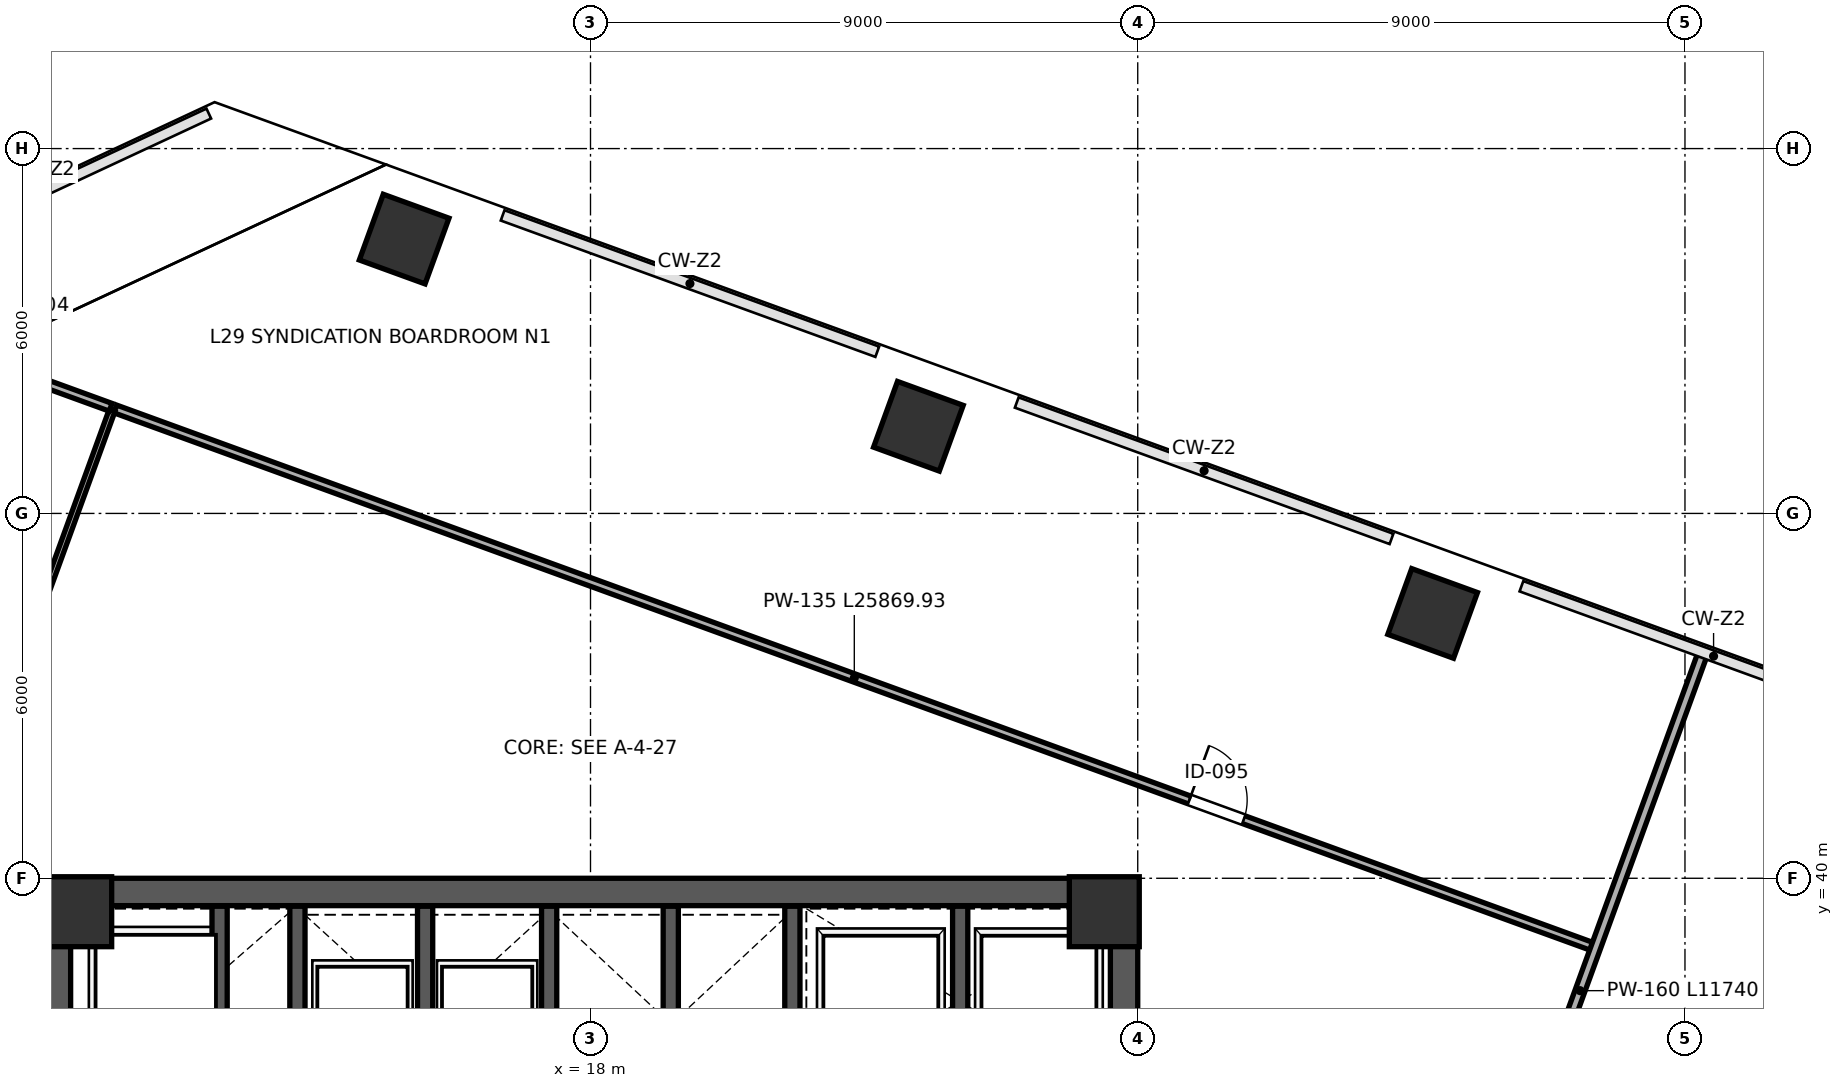
"""IFC4 building model, lengths in metres.
Left out: names, types, materials, properties, quantities, classifications, styles, units other than length and angle.
Written with IfcOpenShell. Run it as: python <this file> out.ifc"""

import sys

from ifc_helpers import new_model, si_unit, direction, frame, frame_2d, origin, origin_2d, place, context, subcontext, project, spatial, rectangle, extrude, clip, halfspace, source, transform, mapped, element, fill, save


model = new_model("IFC4")
c1 = context("Model", 3, precision=1e-05, world=origin(), true_north=direction((0.0, 1.0)))
c2 = subcontext(c1, "Body", "Model", "MODEL_VIEW")
j1 = project(units=[si_unit("LENGTHUNIT", "METRE"), si_unit("PLANEANGLEUNIT", "RADIAN")], contexts=[c1])
p1 = place(None, origin())
s1 = spatial("IfcSite", under=j1, at=p1, CompositionType="ELEMENT")
p2 = place(p1, origin())
s2 = spatial("IfcBuilding", under=s1, at=p2, CompositionType="ELEMENT")
p3 = place(p2, frame((0.0, 0.0, 133.0)))
s3 = spatial("IfcBuildingStorey", under=s2, at=p3, CompositionType="ELEMENT", Elevation=133.0)
m1 = source(origin(), c2, "Body", "SweptSolid", [
    extrude(rectangle(XDim=1.15, YDim=1.15, at=origin_2d()), origin(), (0.0, 0.0, 1.0), 4.198),
])
for number, where, z_axis, x_axis in (
    (1, (9.55, 39.45, 0.001), (0.0, 0.0, 1.0), (1.0, 0.0, 0.0)),
    (2, (26.45, 39.45, 0.001), (0.0, 0.0, 1.0), (1.0, 0.0, 0.0)),
):
    element("IfcColumn", number, at=place(p3, frame(where, z_axis=z_axis, x_axis=x_axis)), inside=s3, PredefinedType="COLUMN", context=c2, shape_type="MappedRepresentation", body=[
        mapped(m1, transform((0.0, 0.0, 0.0), scale=1.0)),
    ])
p4 = place(p3, frame((14.935, 50.512, 0.0), z_axis=(0.096054134155, 0.032846928477, 0.99483399751), x_axis=(-0.017896021663, -0.999236828421, 0.034720212203)))
e3 = element("IfcColumn", 3, at=p4, inside=s3, PredefinedType="COLUMN", context=c2, shape_type="Clipping", body=[
    clip(clip(extrude(rectangle(XDim=1.15, YDim=1.15, at=origin_2d()), origin(), (0.0, 0.0, 1.0), 4.222), halfspace(frame((0.0, 0.0, 0.076), z_axis=(0.0, 0.0, -1.0), x_axis=(1.0, 0.0, 0.0)), False)), halfspace(frame((0.0, 0.0, 4.146), z_axis=(0.0, 0.0, 1.0), x_axis=(1.0, 0.0, 0.0)), False)),
])
p5 = place(p3, frame((23.393, 47.433, 0.0), z_axis=(0.079842016697, -0.010661053028, 0.996750517591), x_axis=(-0.462280065527, -0.886305896254, 0.027549941602)))
e4 = element("IfcColumn", 4, at=p5, inside=s3, PredefinedType="COLUMN", context=c2, shape_type="Clipping", body=[
    clip(clip(extrude(rectangle(XDim=1.15, YDim=1.15, at=origin_2d()), origin(), (0.0, 0.0, 1.0), 4.214), halfspace(frame((0.0, 0.0, 0.06), z_axis=(0.0, 0.0, -1.0), x_axis=(1.0, 0.0, 0.0)), False)), halfspace(frame((0.0, 0.0, 4.153), z_axis=(0.0, 0.0, 1.0), x_axis=(1.0, 0.0, 0.0)), False)),
])
p6 = place(p3, frame((31.85, 44.355, 0.0), z_axis=(0.063371803059, -0.054277312126, 0.996512914099), x_axis=(-0.87013419842, -0.491987882004, 0.028537706658)))
e5 = element("IfcColumn", 5, at=p6, inside=s3, PredefinedType="COLUMN", context=c2, shape_type="Clipping", body=[
    clip(clip(extrude(rectangle(XDim=1.15, YDim=1.15, at=origin_2d()), origin(), (0.0, 0.0, 1.0), 4.215), halfspace(frame((0.0, 0.0, 0.062), z_axis=(0.0, 0.0, -1.0), x_axis=(1.0, 0.0, 0.0)), False)), halfspace(frame((0.0, 0.0, 4.152), z_axis=(0.0, 0.0, 1.0), x_axis=(1.0, 0.0, 0.0)), False)),
])
p7 = place(p3, frame((8.402, 45.281, 0.0), z_axis=(0.069430092702, 0.066942181047, 0.995338237296), x_axis=(0.407164247722, -0.912759098696, 0.03298640818)))
e6 = element("IfcColumn", 6, at=p7, inside=s3, PredefinedType="PILASTER", context=c2, shape_type="Clipping", body=[
    clip(clip(extrude(rectangle(XDim=0.9, YDim=1.3, at=origin_2d()), origin(), (0.0, 0.0, 1.0), 4.22), halfspace(frame((0.0, 0.0, 0.075), z_axis=(0.0, 0.0, -1.0), x_axis=(1.0, 0.0, 0.0)), False)), halfspace(frame((0.0, 0.0, 4.145), z_axis=(0.0, 0.0, 1.0), x_axis=(1.0, 0.0, 0.0)), False)),
])
p8 = place(p3, frame((9.225, 24.45, 0.0), z_axis=(0.0, 0.0, 1.0), x_axis=(0.0, 1.0, 0.0)))
e7 = element("IfcWall", 7, at=p8, inside=s3, PredefinedType="SHEAR", context=c2, shape_type="SweptSolid", body=[
    extrude(rectangle(XDim=15.1, YDim=0.45, at=frame_2d((7.55, 0.0))), origin(), (0.0, 0.0, 1.0), 3.96),
])
p9 = place(p3, frame((26.775, 24.45, 0.0), z_axis=(0.0, 0.0, 1.0), x_axis=(0.0, 1.0, 0.0)))
e8 = element("IfcWall", 8, at=p9, inside=s3, PredefinedType="SHEAR", context=c2, shape_type="SweptSolid", body=[
    extrude(rectangle(XDim=15.1, YDim=0.45, at=frame_2d((7.55, 0.0))), origin(), (0.0, 0.0, 1.0), 3.96),
])
p10 = place(p9, frame((8.6, 0.0, 0.0)))
e9 = element("IfcOpeningElement", 9, at=p10, cuts=e8, PredefinedType="OPENING", context=c2, shape_type="SweptSolid", body=[
    extrude(rectangle(XDim=1.15, YDim=2.2, at=frame_2d((0.575, 1.1))), frame((0.0, 0.235, 0.0), z_axis=(0.0, -1.0, 0.0), x_axis=(1.0, 0.0, 0.0)), (0.0, 0.0, 1.0), 0.47),
])
p11 = place(p3, frame((9.0, 39.775, 0.0), z_axis=(0.0, 0.0, 1.0), x_axis=(1.0, 0.0, 0.0)))
e10 = element("IfcWall", 10, at=p11, inside=s3, PredefinedType="SHEAR", context=c2, shape_type="SweptSolid", body=[
    extrude(rectangle(XDim=18.0, YDim=0.45, at=frame_2d((9.0, 0.0))), origin(), (0.0, 0.0, 1.0), 3.96),
])
p12 = place(p3, frame((21.32, 32.12, 0.0), z_axis=(0.0, 0.0, 1.0), x_axis=(0.0, 1.0, 0.0)))
e11 = element("IfcWall", 11, at=p12, inside=s3, PredefinedType="SHEAR", context=c2, shape_type="SweptSolid", body=[
    extrude(rectangle(XDim=7.42, YDim=0.25, at=frame_2d((3.71, 0.0))), origin(), (0.0, 0.0, 1.0), 3.96),
])
p13 = place(p12, frame((1.4, 0.0, 0.0)))
e12 = element("IfcOpeningElement", 12, at=p13, cuts=e11, PredefinedType="OPENING", context=c2, shape_type="SweptSolid", body=[
    extrude(rectangle(XDim=1.15, YDim=2.2, at=frame_2d((0.575, 1.1))), frame((0.0, 0.135, 0.0), z_axis=(0.0, -1.0, 0.0), x_axis=(1.0, 0.0, 0.0)), (0.0, 0.0, 1.0), 0.27),
])
p14 = place(p3, frame((11.9, 36.31, 0.0), z_axis=(0.0, 0.0, 1.0), x_axis=(0.0, 1.0, 0.0)))
e13 = element("IfcWall", 13, at=p14, inside=s3, PredefinedType="SHEAR", context=c2, shape_type="SweptSolid", body=[
    extrude(rectangle(XDim=3.23, YDim=0.25, at=frame_2d((1.615, 0.0))), origin(), (0.0, 0.0, 1.0), 3.96),
])
p15 = place(p3, frame((24.08, 36.48, 0.0), z_axis=(0.0, 0.0, 1.0), x_axis=(0.0, 1.0, 0.0)))
e14 = element("IfcWall", 14, at=p15, inside=s3, PredefinedType="SHEAR", context=c2, shape_type="SweptSolid", body=[
    extrude(rectangle(XDim=3.06, YDim=0.25, at=frame_2d((1.53, 0.0))), origin(), (0.0, 0.0, 1.0), 3.96),
])
for number, where, z_axis, x_axis in (
    (15, (13.18, 35.81, 0.0), (0.0, 0.0, 1.0), (0.0, 1.0, 0.0)),
    (16, (15.28, 35.81, 0.0), (0.0, 0.0, 1.0), (0.0, 1.0, 0.0)),
    (17, (17.32, 35.81, 0.0), (0.0, 0.0, 1.0), (0.0, 1.0, 0.0)),
    (18, (19.32, 35.81, 0.0), (0.0, 0.0, 1.0), (0.0, 1.0, 0.0)),
):
    element("IfcWall", number, at=place(p3, frame(where, z_axis=z_axis, x_axis=x_axis)), inside=s3, PredefinedType="SHEAR", context=c2, shape_type="SweptSolid", body=[
        extrude(rectangle(XDim=3.73, YDim=0.25, at=frame_2d((1.865, 0.0))), origin(), (0.0, 0.0, 1.0), 3.96),
    ])
p16 = place(p3, frame((10.184, 47.719, 0.0), z_axis=(0.0, 0.0, 1.0), x_axis=(0.939691432235, -0.342023408826, 0.0)))
e19 = element("IfcWall", 19, at=p16, inside=s3, PredefinedType="PARTITIONING", context=c2, shape_type="SweptSolid", body=[
    extrude(rectangle(XDim=25.87, YDim=0.135, at=frame_2d((12.935, 0.0))), origin(), (0.0, 0.0, 1.0), 3.96),
])
p17 = place(p16, frame((18.8, 0.0, 0.0)))
e20 = element("IfcOpeningElement", 20, at=p17, cuts=e19, PredefinedType="OPENING", context=c2, shape_type="SweptSolid", body=[
    extrude(rectangle(XDim=0.95, YDim=2.15, at=frame_2d((0.475, 1.075))), frame((0.0, 0.078, 0.0), z_axis=(0.0, -1.0, 0.0), x_axis=(1.0, 0.0, 0.0)), (0.0, 0.0, 1.0), 0.155),
])
p18 = place(p3, frame((2.362, 26.345, 0.0), z_axis=(0.0, 0.0, 1.0), x_axis=(0.342021727767, 0.939692044095, 0.0)))
e21 = element("IfcWall", 21, at=p18, inside=s3, PredefinedType="PARTITIONING", context=c2, shape_type="SweptSolid", body=[
    extrude(rectangle(XDim=22.72, YDim=0.1, at=frame_2d((11.36, 0.0))), origin(), (0.0, 0.0, 1.0), 3.96),
])
p19 = place(p18, frame((6.2, 0.0, 0.0)))
e22 = element("IfcOpeningElement", 22, at=p19, cuts=e21, PredefinedType="OPENING", context=c2, shape_type="SweptSolid", body=[
    extrude(rectangle(XDim=0.95, YDim=2.15, at=frame_2d((0.475, 1.075))), frame((0.0, 0.06, 0.0), z_axis=(0.0, -1.0, 0.0), x_axis=(1.0, 0.0, 0.0)), (0.0, 0.0, 1.0), 0.12),
])
p20 = place(p3, frame((5.946, 49.261, 0.0), z_axis=(0.0, 0.0, 1.0), x_axis=(0.939693620895, -0.342017395535, 0.0)))
e23 = element("IfcWall", 23, at=p20, inside=s3, PredefinedType="PARTITIONING", context=c2, shape_type="SweptSolid", body=[
    extrude(rectangle(XDim=4.43, YDim=0.135, at=frame_2d((2.215, 0.0))), origin(), (0.0, 0.0, 1.0), 3.96),
])
p21 = place(p3, frame((32.267, 32.636, 0.0), z_axis=(0.0, 0.0, 1.0), x_axis=(0.34200686721, 0.939697452791, 0.0)))
e24 = element("IfcWall", 24, at=p21, inside=s3, PredefinedType="PARTITIONING", context=c2, shape_type="SweptSolid", body=[
    extrude(rectangle(XDim=11.74, YDim=0.16, at=frame_2d((5.87, 0.0))), origin(), (0.0, 0.0, 1.0), 3.195),
])
m2 = source(origin(), c2, "Body", "SweptSolid", [
    extrude(rectangle(XDim=0.95, YDim=2.15, at=frame_2d((0.475, 1.075))), frame((0.0, 0.025, 0.0), z_axis=(0.0, -1.0, 0.0), x_axis=(1.0, 0.0, 0.0)), (0.0, 0.0, 1.0), 0.05),
])
p22 = place(p17, origin())
e25 = element("IfcDoor", 25, at=p22, inside=s3, OperationType="SINGLE_SWING_LEFT", PredefinedType="DOOR", context=c2, shape_type="MappedRepresentation", body=[
    mapped(m2, transform((0.0, 0.0, 0.0), scale=1.0)),
])
fill(e20, e25)
save(model, sys.argv[1])
